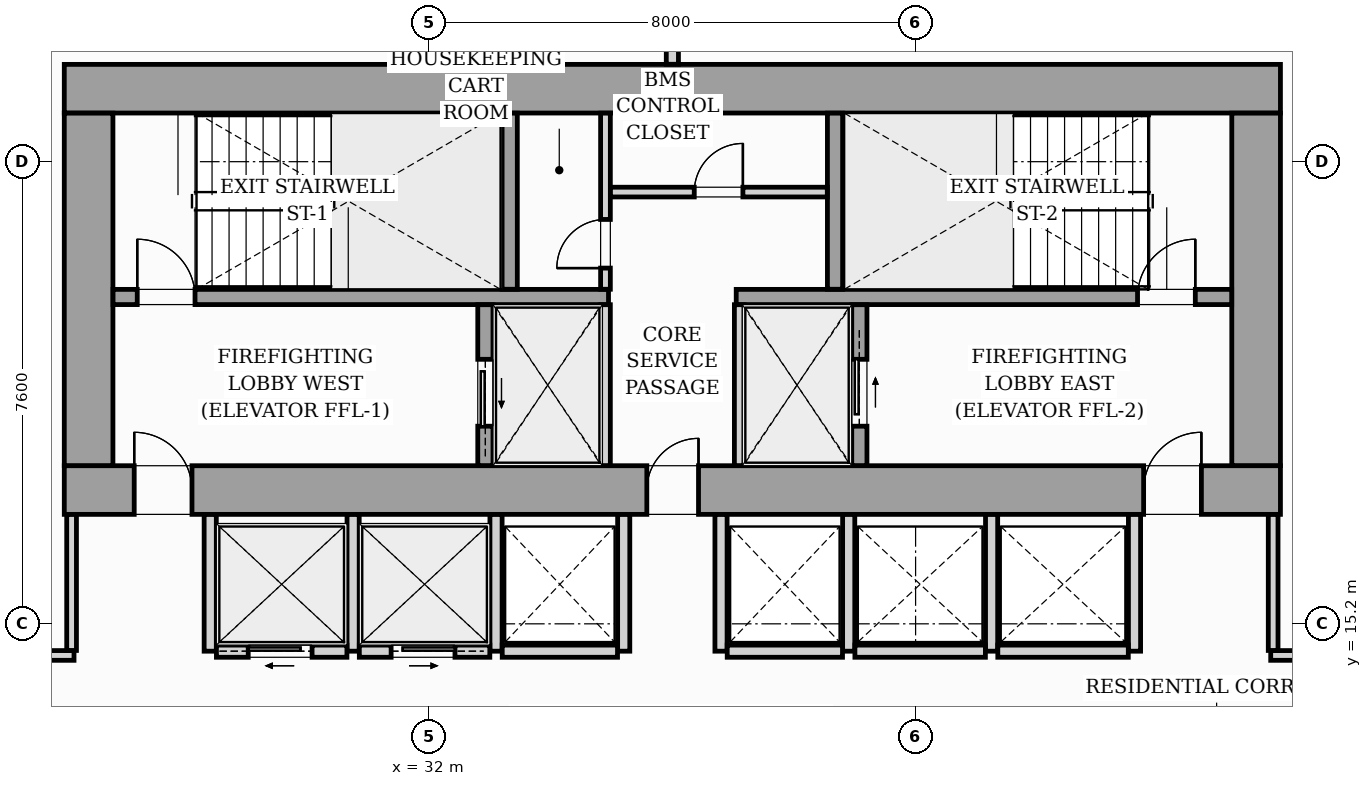
"""IFC4 building model, lengths in metres.
Left out: names, types, materials, properties, quantities, classifications, styles, units other than length and angle.
Written with IfcOpenShell. Run it as: python <this file> out.ifc"""

import sys

from ifc_helpers import new_model, si_unit, direction, frame, frame_2d, origin, origin_2d, place, context, subcontext, project, spatial, rectangle, i_section, extrude, source, transform, mapped, element, fill, save


model = new_model("IFC4")
c1 = context("Model", 3, precision=1e-05, world=origin(), true_north=direction((0.0, 1.0)))
c2 = subcontext(c1, "Body", "Model", "MODEL_VIEW")
j1 = project(units=[si_unit("LENGTHUNIT", "METRE"), si_unit("PLANEANGLEUNIT", "RADIAN")], contexts=[c1])
p1 = place(None, origin())
s1 = spatial("IfcSite", under=j1, at=p1, CompositionType="ELEMENT")
p2 = place(p1, origin())
s2 = spatial("IfcBuilding", under=s1, at=p2, CompositionType="ELEMENT")
p3 = place(p2, frame((0.0, 0.0, 35.8)))
s3 = spatial("IfcBuildingStorey", under=s2, at=p3, CompositionType="ELEMENT", Elevation=35.8)
m1 = source(origin(), c2, "Body", "SweptSolid", [
    extrude(i_section(OverallWidth=0.437, OverallDepth=0.514, WebThickness=0.061, FlangeThickness=0.097, FilletRadius=0.018, at=origin_2d()), origin(), (0.0, 0.0, 1.0), 3.196),
])
for number, where, z_axis, x_axis in (
    (1, (26.4, 17.4, 0.002), (0.0, 0.0, 1.0), (1.0, 0.0, 0.0)),
    (2, (33.12, 17.4, 0.002), (0.0, 0.0, 1.0), (1.0, 0.0, 0.0)),
    (3, (38.88, 17.4, 0.002), (0.0, 0.0, 1.0), (1.0, 0.0, 0.0)),
    (4, (45.6, 17.4, 0.002), (0.0, 0.0, 1.0), (1.0, 0.0, 0.0)),
    (5, (26.4, 24.0, 0.002), (0.0, 0.0, 1.0), (1.0, 0.0, 0.0)),
    (6, (33.12, 24.0, 0.002), (0.0, 0.0, 1.0), (1.0, 0.0, 0.0)),
    (7, (38.88, 24.0, 0.002), (0.0, 0.0, 1.0), (1.0, 0.0, 0.0)),
    (8, (45.6, 24.0, 0.002), (0.0, 0.0, 1.0), (1.0, 0.0, 0.0)),
):
    element("IfcColumn", number, at=place(p3, frame(where, z_axis=z_axis, x_axis=x_axis)), inside=s3, PredefinedType="PILASTER", context=c2, shape_type="MappedRepresentation", body=[
        mapped(m1, transform((0.0, 0.0, 0.0), scale=1.0)),
    ])
p4 = place(p3, frame((26.0, 17.4, 0.0), z_axis=(0.0, 0.0, 1.0), x_axis=(1.0, 0.0, 0.0)))
e9 = element("IfcWall", 9, at=p4, inside=s3, PredefinedType="SHEAR", context=c2, shape_type="SweptSolid", body=[
    extrude(rectangle(XDim=20.0, YDim=0.8, at=frame_2d((10.0, 0.0))), origin(), (0.0, 0.0, 1.0), 3.2),
])
p5 = place(p4, frame((1.15, 0.0, 0.0)))
e10 = element("IfcOpeningElement", 10, at=p5, cuts=e9, PredefinedType="OPENING", context=c2, shape_type="SweptSolid", body=[
    extrude(rectangle(XDim=0.95, YDim=2.06, at=frame_2d((0.475, 1.03))), frame((0.0, 0.41, 0.0), z_axis=(0.0, -1.0, 0.0), x_axis=(1.0, 0.0, 0.0)), (0.0, 0.0, 1.0), 0.82),
])
p6 = place(p4, frame((9.58, 0.0, 0.0)))
e11 = element("IfcOpeningElement", 11, at=p6, cuts=e9, PredefinedType="OPENING", context=c2, shape_type="SweptSolid", body=[
    extrude(rectangle(XDim=0.85, YDim=2.0, at=frame_2d((0.425, 1.0))), frame((0.0, 0.41, 0.0), z_axis=(0.0, -1.0, 0.0), x_axis=(1.0, 0.0, 0.0)), (0.0, 0.0, 1.0), 0.82),
])
p7 = place(p4, frame((17.75, 0.0, 0.0)))
e12 = element("IfcOpeningElement", 12, at=p7, cuts=e9, PredefinedType="OPENING", context=c2, shape_type="SweptSolid", body=[
    extrude(rectangle(XDim=0.95, YDim=2.06, at=frame_2d((0.475, 1.03))), frame((0.0, 0.41, 0.0), z_axis=(0.0, -1.0, 0.0), x_axis=(1.0, 0.0, 0.0)), (0.0, 0.0, 1.0), 0.82),
])
p8 = place(p3, frame((26.0, 24.0, 0.0), z_axis=(0.0, 0.0, 1.0), x_axis=(1.0, 0.0, 0.0)))
e13 = element("IfcWall", 13, at=p8, inside=s3, PredefinedType="SHEAR", context=c2, shape_type="SweptSolid", body=[
    extrude(rectangle(XDim=20.0, YDim=0.8, at=frame_2d((10.0, 0.0))), origin(), (0.0, 0.0, 1.0), 3.2),
])
for number, where, z_axis, x_axis in (
    (14, (26.4, 17.802, 0.0), (0.0, 0.0, 1.0), (0.0, 1.0, 0.0)),
    (15, (45.6, 17.802, 0.0), (0.0, 0.0, 1.0), (0.0, 1.0, 0.0)),
):
    element("IfcWall", number, at=place(p3, frame(where, z_axis=z_axis, x_axis=x_axis)), inside=s3, PredefinedType="SHEAR", context=c2, shape_type="SweptSolid", body=[
        extrude(rectangle(XDim=5.796, YDim=0.8, at=frame_2d((2.898, 0.0))), origin(), (0.0, 0.0, 1.0), 3.2),
    ])
p9 = place(p3, frame((26.802, 20.575, 0.0), z_axis=(0.0, 0.0, 1.0), x_axis=(1.0, 0.0, 0.0)))
e16 = element("IfcWall", 16, at=p9, inside=s3, PredefinedType="SOLIDWALL", context=c2, shape_type="SweptSolid", body=[
    extrude(rectangle(XDim=8.148, YDim=0.25, at=frame_2d((4.074, 0.0))), origin(), (0.0, 0.0, 1.0), 3.2),
])
p10 = place(p9, frame((0.398, 0.0, 0.0)))
e17 = element("IfcOpeningElement", 17, at=p10, cuts=e16, PredefinedType="OPENING", context=c2, shape_type="SweptSolid", body=[
    extrude(rectangle(XDim=0.95, YDim=2.06, at=frame_2d((0.475, 1.03))), frame((0.0, 0.135, 0.0), z_axis=(0.0, -1.0, 0.0), x_axis=(1.0, 0.0, 0.0)), (0.0, 0.0, 1.0), 0.27),
])
p11 = place(p3, frame((37.05, 20.575, 0.0), z_axis=(0.0, 0.0, 1.0), x_axis=(1.0, 0.0, 0.0)))
e18 = element("IfcWall", 18, at=p11, inside=s3, PredefinedType="SOLIDWALL", context=c2, shape_type="SweptSolid", body=[
    extrude(rectangle(XDim=8.148, YDim=0.25, at=frame_2d((4.074, 0.0))), origin(), (0.0, 0.0, 1.0), 3.2),
])
p12 = place(p11, frame((6.6, 0.0, 0.0)))
e19 = element("IfcOpeningElement", 19, at=p12, cuts=e18, PredefinedType="OPENING", context=c2, shape_type="SweptSolid", body=[
    extrude(rectangle(XDim=0.95, YDim=2.06, at=frame_2d((0.475, 1.03))), frame((0.0, 0.135, 0.0), z_axis=(0.0, -1.0, 0.0), x_axis=(1.0, 0.0, 0.0)), (0.0, 0.0, 1.0), 0.27),
])
for number, where, z_axis, x_axis in (
    (20, (33.325, 20.702, 0.0), (0.0, 0.0, 1.0), (0.0, 1.0, 0.0)),
    (21, (38.675, 20.702, 0.0), (0.0, 0.0, 1.0), (0.0, 1.0, 0.0)),
):
    element("IfcWall", number, at=place(p3, frame(where, z_axis=z_axis, x_axis=x_axis)), inside=s3, PredefinedType="SOLIDWALL", context=c2, shape_type="SweptSolid", body=[
        extrude(rectangle(XDim=2.896, YDim=0.25, at=frame_2d((1.448, 0.0))), origin(), (0.0, 0.0, 1.0), 3.2),
    ])
p13 = place(p3, frame((32.925, 17.802, 0.0), z_axis=(0.0, 0.0, 1.0), x_axis=(0.0, 1.0, 0.0)))
e22 = element("IfcWall", 22, at=p13, inside=s3, PredefinedType="SOLIDWALL", context=c2, shape_type="SweptSolid", body=[
    extrude(rectangle(XDim=2.646, YDim=0.25, at=frame_2d((1.323, 0.0))), origin(), (0.0, 0.0, 1.0), 3.2),
])
p14 = place(p13, frame((0.648, 0.0, 0.0)))
e23 = element("IfcOpeningElement", 23, at=p14, cuts=e22, PredefinedType="OPENING", context=c2, shape_type="SweptSolid", body=[
    extrude(rectangle(XDim=1.1, YDim=2.08, at=frame_2d((0.55, 1.04))), frame((0.0, 0.135, 0.0), z_axis=(0.0, -1.0, 0.0), x_axis=(1.0, 0.0, 0.0)), (0.0, 0.0, 1.0), 0.27),
])
for number, where, z_axis, x_axis in (
    (24, (34.9, 17.802, 0.0), (0.0, 0.0, 1.0), (0.0, 1.0, 0.0)),
    (25, (37.1, 17.802, 0.0), (0.0, 0.0, 1.0), (0.0, 1.0, 0.0)),
):
    element("IfcWall", number, at=place(p3, frame(where, z_axis=z_axis, x_axis=x_axis)), inside=s3, PredefinedType="PARTITIONING", context=c2, shape_type="SweptSolid", body=[
        extrude(rectangle(XDim=2.646, YDim=0.16, at=frame_2d((1.323, 0.0))), origin(), (0.0, 0.0, 1.0), 2.94),
    ])
p15 = place(p3, frame((39.075, 17.802, 0.0), z_axis=(0.0, 0.0, 1.0), x_axis=(0.0, 1.0, 0.0)))
e26 = element("IfcWall", 26, at=p15, inside=s3, PredefinedType="SOLIDWALL", context=c2, shape_type="SweptSolid", body=[
    extrude(rectangle(XDim=2.646, YDim=0.25, at=frame_2d((1.323, 0.0))), origin(), (0.0, 0.0, 1.0), 3.2),
])
p16 = place(p15, frame((0.648, 0.0, 0.0)))
e27 = element("IfcOpeningElement", 27, at=p16, cuts=e26, PredefinedType="OPENING", context=c2, shape_type="SweptSolid", body=[
    extrude(rectangle(XDim=1.1, YDim=2.08, at=frame_2d((0.55, 1.04))), frame((0.0, 0.135, 0.0), z_axis=(0.0, -1.0, 0.0), x_axis=(1.0, 0.0, 0.0)), (0.0, 0.0, 1.0), 0.27),
])
p17 = place(p3, frame((34.9, 20.702, 0.0), z_axis=(0.0, 0.0, 1.0), x_axis=(0.0, 1.0, 0.0)))
e28 = element("IfcWall", 28, at=p17, inside=s3, PredefinedType="PARTITIONING", context=c2, shape_type="SweptSolid", body=[
    extrude(rectangle(XDim=2.896, YDim=0.16, at=frame_2d((1.448, 0.0))), origin(), (0.0, 0.0, 1.0), 2.94),
])
p18 = place(p17, frame((0.348, 0.0, 0.0)))
e29 = element("IfcOpeningElement", 29, at=p18, cuts=e28, PredefinedType="OPENING", context=c2, shape_type="SweptSolid", body=[
    extrude(rectangle(XDim=0.8, YDim=2.05, at=frame_2d((0.4, 1.025))), frame((0.0, 0.09, 0.0), z_axis=(0.0, -1.0, 0.0), x_axis=(1.0, 0.0, 0.0)), (0.0, 0.0, 1.0), 0.18),
])
p19 = place(p3, frame((34.982, 22.3, 0.0), z_axis=(0.0, 0.0, 1.0), x_axis=(1.0, 0.0, 0.0)))
e30 = element("IfcWall", 30, at=p19, inside=s3, PredefinedType="PARTITIONING", context=c2, shape_type="SweptSolid", body=[
    extrude(rectangle(XDim=3.566, YDim=0.16, at=frame_2d((1.783, 0.0))), origin(), (0.0, 0.0, 1.0), 2.94),
])
p20 = place(p19, frame((1.378, 0.0, 0.0)))
e31 = element("IfcOpeningElement", 31, at=p20, cuts=e30, PredefinedType="OPENING", context=c2, shape_type="SweptSolid", body=[
    extrude(rectangle(XDim=0.8, YDim=2.05, at=frame_2d((0.4, 1.025))), frame((0.0, 0.09, 0.0), z_axis=(0.0, -1.0, 0.0), x_axis=(1.0, 0.0, 0.0)), (0.0, 0.0, 1.0), 0.18),
])
for number, where, z_axis, x_axis in (
    (32, (28.4, 14.75, 0.0), (0.0, 0.0, 1.0), (0.0, 1.0, 0.0)),
    (33, (30.75, 14.75, 0.0), (0.0, 0.0, 1.0), (0.0, 1.0, 0.0)),
    (34, (33.1, 14.75, 0.0), (0.0, 0.0, 1.0), (0.0, 1.0, 0.0)),
):
    element("IfcWall", number, at=place(p3, frame(where, z_axis=z_axis, x_axis=x_axis)), inside=s3, PredefinedType="PARTITIONING", context=c2, shape_type="SweptSolid", body=[
        extrude(rectangle(XDim=2.248, YDim=0.2, at=frame_2d((1.124, 0.0))), origin(), (0.0, 0.0, 1.0), 2.94),
    ])
p21 = place(p3, frame((28.502, 14.75, 0.0), z_axis=(0.0, 0.0, 1.0), x_axis=(1.0, 0.0, 0.0)))
e35 = element("IfcWall", 35, at=p21, inside=s3, PredefinedType="PARTITIONING", context=c2, shape_type="SweptSolid", body=[
    extrude(rectangle(XDim=2.146, YDim=0.2, at=frame_2d((1.073, 0.0))), origin(), (0.0, 0.0, 1.0), 2.94),
])
p22 = place(p21, frame((0.523, 0.0, 0.0)))
e36 = element("IfcOpeningElement", 36, at=p22, cuts=e35, PredefinedType="OPENING", context=c2, shape_type="SweptSolid", body=[
    extrude(rectangle(XDim=1.05, YDim=2.08, at=frame_2d((0.525, 1.04))), frame((0.0, 0.11, 0.0), z_axis=(0.0, -1.0, 0.0), x_axis=(1.0, 0.0, 0.0)), (0.0, 0.0, 1.0), 0.22),
])
p23 = place(p3, frame((30.852, 14.75, 0.0), z_axis=(0.0, 0.0, 1.0), x_axis=(1.0, 0.0, 0.0)))
e37 = element("IfcWall", 37, at=p23, inside=s3, PredefinedType="PARTITIONING", context=c2, shape_type="SweptSolid", body=[
    extrude(rectangle(XDim=2.146, YDim=0.2, at=frame_2d((1.073, 0.0))), origin(), (0.0, 0.0, 1.0), 2.94),
])
p24 = place(p23, frame((0.523, 0.0, 0.0)))
e38 = element("IfcOpeningElement", 38, at=p24, cuts=e37, PredefinedType="OPENING", context=c2, shape_type="SweptSolid", body=[
    extrude(rectangle(XDim=1.05, YDim=2.08, at=frame_2d((0.525, 1.04))), frame((0.0, 0.11, 0.0), z_axis=(0.0, -1.0, 0.0), x_axis=(1.0, 0.0, 0.0)), (0.0, 0.0, 1.0), 0.22),
])
p25 = place(p3, frame((35.2, 14.75, 0.0), z_axis=(0.0, 0.0, 1.0), x_axis=(0.0, 1.0, 0.0)))
e39 = element("IfcWall", 39, at=p25, inside=s3, PredefinedType="PARTITIONING", context=c2, shape_type="SweptSolid", body=[
    extrude(rectangle(XDim=2.248, YDim=0.2, at=frame_2d((1.124, 0.0))), origin(), (0.0, 0.0, 1.0), 2.94),
])
p26 = place(p3, frame((33.202, 14.75, 0.0), z_axis=(0.0, 0.0, 1.0), x_axis=(1.0, 0.0, 0.0)))
e40 = element("IfcWall", 40, at=p26, inside=s3, PredefinedType="PARTITIONING", context=c2, shape_type="SweptSolid", body=[
    extrude(rectangle(XDim=1.896, YDim=0.2, at=frame_2d((0.948, 0.0))), origin(), (0.0, 0.0, 1.0), 2.94),
])
for number, where, z_axis, x_axis in (
    (41, (36.8, 14.75, 0.0), (0.0, 0.0, 1.0), (0.0, 1.0, 0.0)),
    (42, (38.9, 14.75, 0.0), (0.0, 0.0, 1.0), (0.0, 1.0, 0.0)),
):
    element("IfcWall", number, at=place(p3, frame(where, z_axis=z_axis, x_axis=x_axis)), inside=s3, PredefinedType="PARTITIONING", context=c2, shape_type="SweptSolid", body=[
        extrude(rectangle(XDim=2.248, YDim=0.2, at=frame_2d((1.124, 0.0))), origin(), (0.0, 0.0, 1.0), 2.94),
    ])
p27 = place(p3, frame((36.902, 14.75, 0.0), z_axis=(0.0, 0.0, 1.0), x_axis=(1.0, 0.0, 0.0)))
e43 = element("IfcWall", 43, at=p27, inside=s3, PredefinedType="PARTITIONING", context=c2, shape_type="SweptSolid", body=[
    extrude(rectangle(XDim=1.896, YDim=0.2, at=frame_2d((0.948, 0.0))), origin(), (0.0, 0.0, 1.0), 2.94),
])
for number, where, z_axis, x_axis in (
    (44, (41.25, 14.75, 0.0), (0.0, 0.0, 1.0), (0.0, 1.0, 0.0)),
    (45, (43.6, 14.75, 0.0), (0.0, 0.0, 1.0), (0.0, 1.0, 0.0)),
):
    element("IfcWall", number, at=place(p3, frame(where, z_axis=z_axis, x_axis=x_axis)), inside=s3, PredefinedType="PARTITIONING", context=c2, shape_type="SweptSolid", body=[
        extrude(rectangle(XDim=2.248, YDim=0.2, at=frame_2d((1.124, 0.0))), origin(), (0.0, 0.0, 1.0), 2.94),
    ])
for number, where, z_axis, x_axis in (
    (46, (39.002, 14.75, 0.0), (0.0, 0.0, 1.0), (1.0, 0.0, 0.0)),
    (47, (41.352, 14.75, 0.0), (0.0, 0.0, 1.0), (1.0, 0.0, 0.0)),
):
    element("IfcWall", number, at=place(p3, frame(where, z_axis=z_axis, x_axis=x_axis)), inside=s3, PredefinedType="PARTITIONING", context=c2, shape_type="SweptSolid", body=[
        extrude(rectangle(XDim=2.146, YDim=0.2, at=frame_2d((1.073, 0.0))), origin(), (0.0, 0.0, 1.0), 2.94),
    ])
p28 = place(p3, frame((36.0, 24.402, 0.0), z_axis=(0.0, 0.0, 1.0), x_axis=(0.0, 1.0, 0.0)))
e48 = element("IfcWall", 48, at=p28, inside=s3, PredefinedType="PARTITIONING", context=c2, shape_type="SweptSolid", body=[
    extrude(rectangle(XDim=3.218, YDim=0.2, at=frame_2d((1.609, 0.0))), origin(), (0.0, 0.0, 1.0), 2.94),
])
p29 = place(p3, frame((18.332, 14.68, 0.0), z_axis=(0.0, 0.0, 1.0), x_axis=(1.0, 0.0, 0.0)))
e49 = element("IfcWall", 49, at=p29, inside=s3, PredefinedType="PARTITIONING", context=c2, shape_type="SweptSolid", body=[
    extrude(rectangle(XDim=7.828, YDim=0.16, at=frame_2d((3.914, 0.0))), origin(), (0.0, 0.0, 1.0), 2.94),
])
p30 = place(p29, frame((3.338, 0.0, 0.0)))
e50 = element("IfcOpeningElement", 50, at=p30, cuts=e49, PredefinedType="OPENING", context=c2, shape_type="SweptSolid", body=[
    extrude(rectangle(XDim=0.95, YDim=2.06, at=frame_2d((0.475, 1.03))), frame((0.0, 0.09, 0.0), z_axis=(0.0, -1.0, 0.0), x_axis=(1.0, 0.0, 0.0)), (0.0, 0.0, 1.0), 0.18),
])
p31 = place(p3, frame((26.12, 14.762, 0.0), z_axis=(0.0, 0.0, 1.0), x_axis=(0.0, 1.0, 0.0)))
e51 = element("IfcWall", 51, at=p31, inside=s3, PredefinedType="PARTITIONING", context=c2, shape_type="SweptSolid", body=[
    extrude(rectangle(XDim=2.236, YDim=0.16, at=frame_2d((1.118, 0.0))), origin(), (0.0, 0.0, 1.0), 2.94),
])
p32 = place(p3, frame((45.84, 14.68, 0.0), z_axis=(0.0, 0.0, 1.0), x_axis=(1.0, 0.0, 0.0)))
e52 = element("IfcWall", 52, at=p32, inside=s3, PredefinedType="PARTITIONING", context=c2, shape_type="SweptSolid", body=[
    extrude(rectangle(XDim=5.578, YDim=0.16, at=frame_2d((2.789, 0.0))), origin(), (0.0, 0.0, 1.0), 2.94),
])
p33 = place(p32, frame((2.415, 0.0, 0.0)))
e53 = element("IfcOpeningElement", 53, at=p33, cuts=e52, PredefinedType="OPENING", context=c2, shape_type="SweptSolid", body=[
    extrude(rectangle(XDim=0.95, YDim=2.06, at=frame_2d((0.475, 1.03))), frame((0.0, 0.09, 0.0), z_axis=(0.0, -1.0, 0.0), x_axis=(1.0, 0.0, 0.0)), (0.0, 0.0, 1.0), 0.18),
])
p34 = place(p3, frame((45.88, 14.762, 0.0), z_axis=(0.0, 0.0, 1.0), x_axis=(0.0, 1.0, 0.0)))
e54 = element("IfcWall", 54, at=p34, inside=s3, PredefinedType="PARTITIONING", context=c2, shape_type="SweptSolid", body=[
    extrude(rectangle(XDim=2.236, YDim=0.16, at=frame_2d((1.118, 0.0))), origin(), (0.0, 0.0, 1.0), 2.94),
])
m2 = source(origin(), c2, "Body", "SweptSolid", [
    extrude(rectangle(XDim=0.95, YDim=2.06, at=frame_2d((0.475, 1.03))), frame((0.0, 0.025, 0.0), z_axis=(0.0, -1.0, 0.0), x_axis=(1.0, 0.0, 0.0)), (0.0, 0.0, 1.0), 0.05),
])
p35 = place(p5, origin())
e55 = element("IfcDoor", 55, at=p35, inside=s3, OperationType="SINGLE_SWING_LEFT", PredefinedType="DOOR", context=c2, shape_type="MappedRepresentation", body=[
    mapped(m2, transform((0.0, 0.0, 0.0), scale=1.0)),
])
fill(e10, e55)
m3 = source(origin(), c2, "Body", "SweptSolid", [
    extrude(rectangle(XDim=0.85, YDim=2.0, at=frame_2d((0.425, 1.0))), frame((0.0, 0.025, 0.0), z_axis=(0.0, -1.0, 0.0), x_axis=(1.0, 0.0, 0.0)), (0.0, 0.0, 1.0), 0.05),
])
p36 = place(p6, origin())
e56 = element("IfcDoor", 56, at=p36, inside=s3, OperationType="SINGLE_SWING_RIGHT", PredefinedType="DOOR", context=c2, shape_type="MappedRepresentation", body=[
    mapped(m3, transform((0.0, 0.0, 0.0), scale=1.0)),
])
fill(e11, e56)
p37 = place(p7, origin())
e57 = element("IfcDoor", 57, at=p37, inside=s3, OperationType="SINGLE_SWING_RIGHT", PredefinedType="DOOR", context=c2, shape_type="MappedRepresentation", body=[
    mapped(m2, transform((0.0, 0.0, 0.0), scale=1.0)),
])
fill(e12, e57)
p38 = place(p10, origin())
e58 = element("IfcDoor", 58, at=p38, inside=s3, OperationType="SINGLE_SWING_LEFT", PredefinedType="DOOR", context=c2, shape_type="MappedRepresentation", body=[
    mapped(m2, transform((0.0, 0.0, 0.0), scale=1.0)),
])
fill(e17, e58)
p39 = place(p12, origin())
e59 = element("IfcDoor", 59, at=p39, inside=s3, OperationType="SINGLE_SWING_RIGHT", PredefinedType="DOOR", context=c2, shape_type="MappedRepresentation", body=[
    mapped(m2, transform((0.0, 0.0, 0.0), scale=1.0)),
])
fill(e19, e59)
m4 = source(origin(), c2, "Body", "SweptSolid", [
    extrude(rectangle(XDim=1.1, YDim=2.08, at=frame_2d((0.55, 1.04))), frame((0.0, 0.025, 0.0), z_axis=(0.0, -1.0, 0.0), x_axis=(1.0, 0.0, 0.0)), (0.0, 0.0, 1.0), 0.05),
])
p40 = place(p14, origin())
e60 = element("IfcDoor", 60, at=p40, inside=s3, OperationType="SLIDING_TO_LEFT", PredefinedType="DOOR", context=c2, shape_type="MappedRepresentation", body=[
    mapped(m4, transform((0.0, 0.0, 0.0), scale=1.0)),
])
fill(e23, e60)
p41 = place(p16, origin())
e61 = element("IfcDoor", 61, at=p41, inside=s3, OperationType="SLIDING_TO_RIGHT", PredefinedType="DOOR", context=c2, shape_type="MappedRepresentation", body=[
    mapped(m4, transform((0.0, 0.0, 0.0), scale=1.0)),
])
fill(e27, e61)
m5 = source(origin(), c2, "Body", "SweptSolid", [
    extrude(rectangle(XDim=0.8, YDim=2.05, at=frame_2d((0.4, 1.025))), frame((0.0, 0.025, 0.0), z_axis=(0.0, -1.0, 0.0), x_axis=(1.0, 0.0, 0.0)), (0.0, 0.0, 1.0), 0.05),
])
p42 = place(p18, origin())
e62 = element("IfcDoor", 62, at=p42, inside=s3, OperationType="SINGLE_SWING_LEFT", PredefinedType="DOOR", context=c2, shape_type="MappedRepresentation", body=[
    mapped(m5, transform((0.0, 0.0, 0.0), scale=1.0)),
])
fill(e29, e62)
p43 = place(p20, origin())
e63 = element("IfcDoor", 63, at=p43, inside=s3, OperationType="SINGLE_SWING_RIGHT", PredefinedType="DOOR", context=c2, shape_type="MappedRepresentation", body=[
    mapped(m5, transform((0.0, 0.0, 0.0), scale=1.0)),
])
fill(e31, e63)
m6 = source(origin(), c2, "Body", "SweptSolid", [
    extrude(rectangle(XDim=1.05, YDim=2.08, at=frame_2d((0.525, 1.04))), frame((0.0, 0.025, 0.0), z_axis=(0.0, -1.0, 0.0), x_axis=(1.0, 0.0, 0.0)), (0.0, 0.0, 1.0), 0.05),
])
p44 = place(p22, origin())
e64 = element("IfcDoor", 64, at=p44, inside=s3, OperationType="SLIDING_TO_LEFT", PredefinedType="DOOR", context=c2, shape_type="MappedRepresentation", body=[
    mapped(m6, transform((0.0, 0.0, 0.0), scale=1.0)),
])
fill(e36, e64)
p45 = place(p24, origin())
e65 = element("IfcDoor", 65, at=p45, inside=s3, OperationType="SLIDING_TO_RIGHT", PredefinedType="DOOR", context=c2, shape_type="MappedRepresentation", body=[
    mapped(m6, transform((0.0, 0.0, 0.0), scale=1.0)),
])
fill(e38, e65)
save(model, sys.argv[1])
